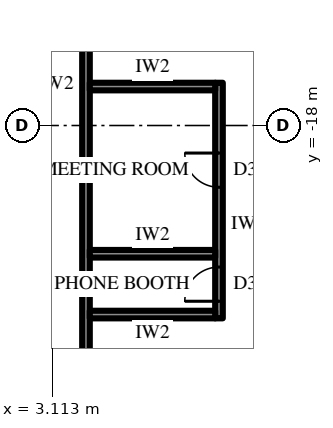
"""IFC4 building model, lengths in metres.
Left out: names, types, materials, properties, quantities, classifications, styles, units other than length and angle.
Written with IfcOpenShell. Run it as: python <this file> out.ifc"""

import sys

from ifc_helpers import new_model, si_unit, direction, frame, frame_2d, origin, place, context, subcontext, project, spatial, rectangle, extrude, element, fill, save


model = new_model("IFC4")
c1 = context("Model", 3, precision=1e-05, world=origin(), true_north=direction((0.0, 1.0)))
c2 = subcontext(c1, "Body", "Model", "MODEL_VIEW")
j1 = project(units=[si_unit("LENGTHUNIT", "METRE"), si_unit("PLANEANGLEUNIT", "RADIAN")], contexts=[c1])
p1 = place(None, origin())
s1 = spatial("IfcSite", under=j1, at=p1, CompositionType="ELEMENT")
p2 = place(p1, origin())
s2 = spatial("IfcBuilding", under=s1, at=p2, CompositionType="ELEMENT")
p3 = place(p2, frame((0.0, 0.0, 228.1)))
s3 = spatial("IfcBuildingStorey", under=s2, at=p3, CompositionType="ELEMENT", Elevation=228.1)
p4 = place(p3, frame((4.0, -12.3, 0.0), z_axis=(0.0, 0.0, 1.0), x_axis=(0.0, -1.0, 0.0)))
e1 = element("IfcWall", 1, at=p4, inside=s3, PredefinedType="PARTITIONING", context=c2, shape_type="SweptSolid", body=[
    extrude(rectangle(XDim=15.35, YDim=0.2, at=frame_2d((7.675, 0.0))), origin(), (0.0, 0.0, 1.0), 4.0),
])
p5 = place(p3, frame((7.5, -16.875, 0.0), z_axis=(0.0, 0.0, 1.0), x_axis=(0.0, -1.0, 0.0)))
e2 = element("IfcWall", 2, at=p5, inside=s3, PredefinedType="PARTITIONING", context=c2, shape_type="SweptSolid", body=[
    extrude(rectangle(XDim=6.2, YDim=0.2, at=frame_2d((3.1, 0.0))), origin(), (0.0, 0.0, 1.0), 4.0),
])
p6 = place(p5, frame((1.85, 0.0, 0.0)))
e3 = element("IfcOpeningElement", 3, at=p6, cuts=e2, PredefinedType="OPENING", context=c2, shape_type="SweptSolid", body=[
    extrude(rectangle(XDim=0.9, YDim=2.2, at=frame_2d((0.45, 1.1))), frame((0.0, 0.11, 0.0), z_axis=(0.0, -1.0, 0.0), x_axis=(1.0, 0.0, 0.0)), (0.0, 0.0, 1.0), 0.22),
])
p7 = place(p5, frame((4.85, 0.0, 0.0)))
e4 = element("IfcOpeningElement", 4, at=p7, cuts=e2, PredefinedType="OPENING", context=c2, shape_type="SweptSolid", body=[
    extrude(rectangle(XDim=0.9, YDim=2.2, at=frame_2d((0.45, 1.1))), frame((0.0, 0.11, 0.0), z_axis=(0.0, -1.0, 0.0), x_axis=(1.0, 0.0, 0.0)), (0.0, 0.0, 1.0), 0.22),
])
for number, where, z_axis, x_axis in (
    (5, (4.1, -16.975, 0.0), (0.0, 0.0, 1.0), (1.0, 0.0, 0.0)),
    (6, (4.1, -21.375, 0.0), (0.0, 0.0, 1.0), (1.0, 0.0, 0.0)),
    (7, (4.1, -22.975, 0.0), (0.0, 0.0, 1.0), (1.0, 0.0, 0.0)),
):
    element("IfcWall", number, at=place(p3, frame(where, z_axis=z_axis, x_axis=x_axis)), inside=s3, PredefinedType="PARTITIONING", context=c2, shape_type="SweptSolid", body=[
        extrude(rectangle(XDim=3.3, YDim=0.2, at=frame_2d((1.65, 0.0))), origin(), (0.0, 0.0, 1.0), 4.0),
    ])
p8 = place(p6, frame((0.9, 0.0, 0.0), z_axis=(0.0, 0.0, 1.0), x_axis=(-1.0, 0.0, 0.0)))
e8 = element("IfcDoor", 8, at=p8, inside=s3, OperationType="SINGLE_SWING_LEFT", PredefinedType="DOOR", context=c2, shape_type="SweptSolid", body=[
    extrude(rectangle(XDim=0.9, YDim=2.2, at=frame_2d((0.45, 1.1))), frame((0.0, 0.025, 0.0), z_axis=(0.0, -1.0, 0.0), x_axis=(1.0, 0.0, 0.0)), (0.0, 0.0, 1.0), 0.05),
])
fill(e3, e8)
p9 = place(p7, frame((0.9, 0.0, 0.0), z_axis=(0.0, 0.0, 1.0), x_axis=(-1.0, 0.0, 0.0)))
e9 = element("IfcDoor", 9, at=p9, inside=s3, OperationType="SINGLE_SWING_RIGHT", PredefinedType="DOOR", context=c2, shape_type="SweptSolid", body=[
    extrude(rectangle(XDim=0.9, YDim=2.2, at=frame_2d((0.45, 1.1))), frame((0.0, 0.025, 0.0), z_axis=(0.0, -1.0, 0.0), x_axis=(1.0, 0.0, 0.0)), (0.0, 0.0, 1.0), 0.05),
])
fill(e4, e9)
save(model, sys.argv[1])
